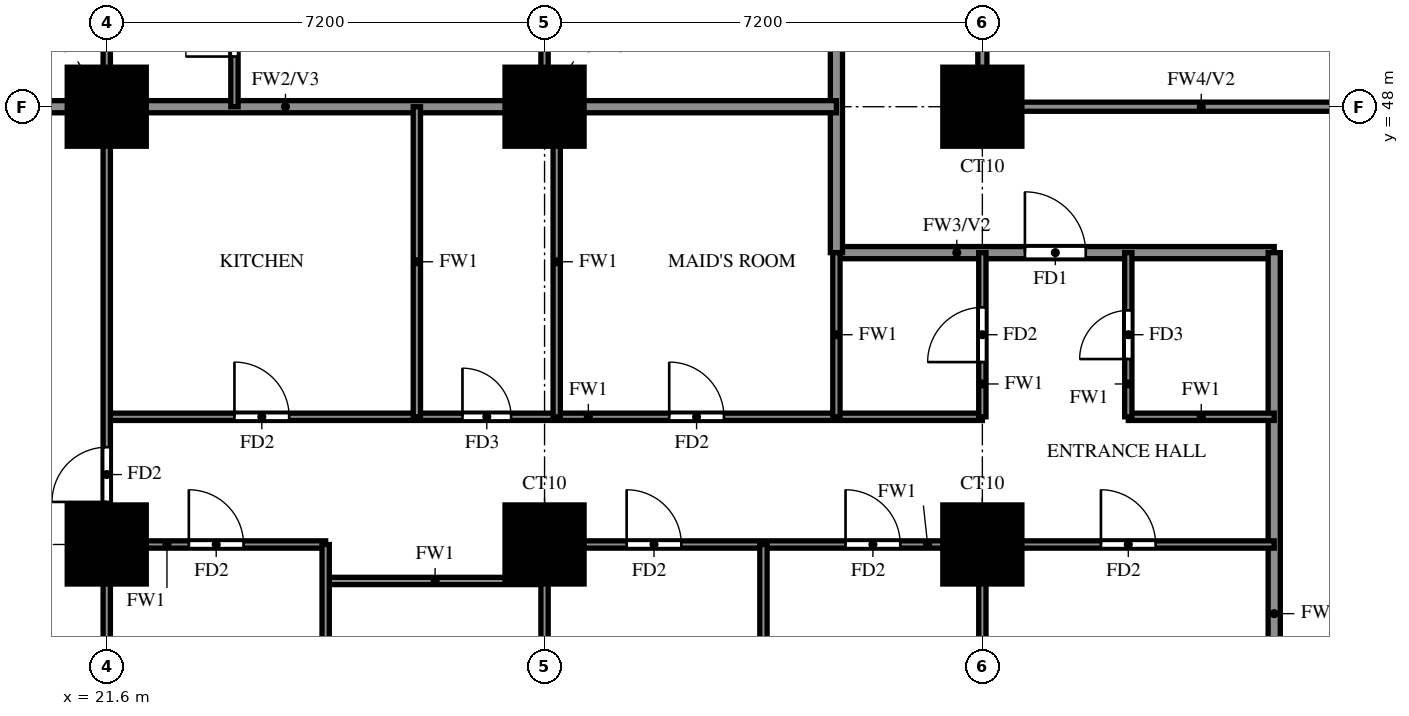
"""IFC4 building model, lengths in metres.
Left out: names, types, materials, properties, quantities, classifications, styles, units other than length and angle.
Written with IfcOpenShell. Run it as: python <this file> out.ifc"""

import sys

from ifc_helpers import new_model, si_unit, direction, frame, frame_2d, origin, origin_2d, place, context, subcontext, project, spatial, rectangle, extrude, source, transform, mapped, element, fill, save


model = new_model("IFC4")
c1 = context("Model", 3, precision=1e-05, world=origin(), true_north=direction((0.0, 1.0)))
c2 = subcontext(c1, "Body", "Model", "MODEL_VIEW")
j1 = project(units=[si_unit("LENGTHUNIT", "METRE"), si_unit("PLANEANGLEUNIT", "RADIAN")], contexts=[c1])
p1 = place(None, origin())
s1 = spatial("IfcSite", under=j1, at=p1, CompositionType="ELEMENT")
p2 = place(p1, origin())
s2 = spatial("IfcBuilding", under=s1, at=p2, CompositionType="ELEMENT")
p3 = place(p2, frame((0.0, 0.0, 86.5)))
s3 = spatial("IfcBuildingStorey", under=s2, at=p3, CompositionType="ELEMENT", Elevation=86.5)
m1 = source(origin(), c2, "Body", "SweptSolid", [
    extrude(rectangle(XDim=1.3, YDim=1.3, at=origin_2d()), origin(), (0.0, 0.0, 1.0), 3.18),
])
for number, where, z_axis, x_axis in (
    (1, (21.6, 40.8, 0.0), (0.0, 0.0, 1.0), (1.0, 0.0, 0.0)),
    (2, (28.8, 40.8, 0.0), (0.0, 0.0, 1.0), (1.0, 0.0, 0.0)),
    (3, (36.0, 40.8, 0.0), (0.0, 0.0, 1.0), (1.0, 0.0, 0.0)),
    (4, (21.6, 48.0, 0.0), (0.0, 0.0, 1.0), (1.0, 0.0, 0.0)),
    (5, (28.8, 48.0, 0.0), (0.0, 0.0, 1.0), (1.0, 0.0, 0.0)),
    (6, (36.0, 48.0, 0.0), (0.0, 0.0, 1.0), (1.0, 0.0, 0.0)),
):
    element("IfcColumn", number, at=place(p3, frame(where, z_axis=z_axis, x_axis=x_axis)), inside=s3, PredefinedType="COLUMN", context=c2, shape_type="MappedRepresentation", body=[
        mapped(m1, transform((0.0, 0.0, 0.0))),
    ])
p4 = place(p3, frame((33.6, 45.6, 0.0), z_axis=(0.0, 0.0, 1.0), x_axis=(1.0, 0.0, 0.0)))
e7 = element("IfcWall", 7, at=p4, inside=s3, PredefinedType="SOLIDWALL", context=c2, shape_type="SweptSolid", body=[
    extrude(rectangle(XDim=7.2, YDim=0.2, at=frame_2d((3.6, 0.0))), origin(), (0.0, 0.0, 1.0), 3.18),
])
p5 = place(p4, frame((3.1, 0.0, 0.0)))
e8 = element("IfcOpeningElement", 8, at=p5, cuts=e7, PredefinedType="OPENING", context=c2, shape_type="SweptSolid", body=[
    extrude(rectangle(XDim=1.0, YDim=2.1, at=frame_2d((0.5, 1.05))), frame((0.0, 0.11, 0.0), z_axis=(0.0, -1.0, 0.0), x_axis=(1.0, 0.0, 0.0)), (0.0, 0.0, 1.0), 0.22),
])
p6 = place(p3, frame((33.6, 45.6, 0.0), z_axis=(0.0, 0.0, 1.0), x_axis=(0.0, 1.0, 0.0)))
e9 = element("IfcWall", 9, at=p6, inside=s3, PredefinedType="SOLIDWALL", context=c2, shape_type="SweptSolid", body=[
    extrude(rectangle(XDim=12.0, YDim=0.2, at=frame_2d((6.0, 0.0))), origin(), (0.0, 0.0, 1.0), 3.18),
])
p7 = place(p3, frame((40.8, 33.725, 0.0), z_axis=(0.0, 0.0, 1.0), x_axis=(0.0, 1.0, 0.0)))
e10 = element("IfcWall", 10, at=p7, inside=s3, PredefinedType="SOLIDWALL", context=c2, shape_type="SweptSolid", body=[
    extrude(rectangle(XDim=11.875, YDim=0.2, at=frame_2d((5.938, 0.0))), origin(), (0.0, 0.0, 1.0), 2.28),
])
p8 = place(p3, frame((14.525, 48.0, 0.0), z_axis=(0.0, 0.0, 1.0), x_axis=(1.0, 0.0, 0.0)))
e11 = element("IfcWall", 11, at=p8, inside=s3, PredefinedType="SOLIDWALL", context=c2, shape_type="SweptSolid", body=[
    extrude(rectangle(XDim=19.075, YDim=0.2, at=frame_2d((9.538, 0.0))), origin(), (0.0, 0.0, 1.0), 3.18),
])
p9 = place(p3, frame((25.2, 40.2, 0.0), z_axis=(0.0, 0.0, 1.0), x_axis=(1.0, 0.0, 0.0)))
e12 = element("IfcWall", 12, at=p9, inside=s3, PredefinedType="PARTITIONING", context=c2, shape_type="SweptSolid", body=[
    extrude(rectangle(XDim=3.6, YDim=0.12, at=frame_2d((1.8, 0.0))), origin(), (0.0, 0.0, 1.0), 3.18),
])
p10 = place(p3, frame((21.6, 40.8, 0.0), z_axis=(0.0, 0.0, 1.0), x_axis=(1.0, 0.0, 0.0)))
e13 = element("IfcWall", 13, at=p10, inside=s3, PredefinedType="PARTITIONING", context=c2, shape_type="SweptSolid", body=[
    extrude(rectangle(XDim=3.6, YDim=0.12, at=frame_2d((1.8, 0.0))), origin(), (0.0, 0.0, 1.0), 3.18),
])
p11 = place(p10, frame((1.35, 0.0, 0.0)))
e14 = element("IfcOpeningElement", 14, at=p11, cuts=e13, PredefinedType="OPENING", context=c2, shape_type="SweptSolid", body=[
    extrude(rectangle(XDim=0.9, YDim=2.1, at=frame_2d((0.45, 1.05))), frame((0.0, 0.07, 0.0), z_axis=(0.0, -1.0, 0.0), x_axis=(1.0, 0.0, 0.0)), (0.0, 0.0, 1.0), 0.14),
])
p12 = place(p3, frame((28.8, 40.8, 0.0), z_axis=(0.0, 0.0, 1.0), x_axis=(1.0, 0.0, 0.0)))
e15 = element("IfcWall", 15, at=p12, inside=s3, PredefinedType="PARTITIONING", context=c2, shape_type="SweptSolid", body=[
    extrude(rectangle(XDim=12.0, YDim=0.12, at=frame_2d((6.0, 0.0))), origin(), (0.0, 0.0, 1.0), 3.18),
])
p13 = place(p12, frame((1.35, 0.0, 0.0)))
e16 = element("IfcOpeningElement", 16, at=p13, cuts=e15, PredefinedType="OPENING", context=c2, shape_type="SweptSolid", body=[
    extrude(rectangle(XDim=0.9, YDim=2.1, at=frame_2d((0.45, 1.05))), frame((0.0, 0.07, 0.0), z_axis=(0.0, -1.0, 0.0), x_axis=(1.0, 0.0, 0.0)), (0.0, 0.0, 1.0), 0.14),
])
p14 = place(p12, frame((4.95, 0.0, 0.0)))
e17 = element("IfcOpeningElement", 17, at=p14, cuts=e15, PredefinedType="OPENING", context=c2, shape_type="SweptSolid", body=[
    extrude(rectangle(XDim=0.9, YDim=2.1, at=frame_2d((0.45, 1.05))), frame((0.0, 0.07, 0.0), z_axis=(0.0, -1.0, 0.0), x_axis=(1.0, 0.0, 0.0)), (0.0, 0.0, 1.0), 0.14),
])
p15 = place(p12, frame((9.15, 0.0, 0.0)))
e18 = element("IfcOpeningElement", 18, at=p15, cuts=e15, PredefinedType="OPENING", context=c2, shape_type="SweptSolid", body=[
    extrude(rectangle(XDim=0.9, YDim=2.1, at=frame_2d((0.45, 1.05))), frame((0.0, 0.07, 0.0), z_axis=(0.0, -1.0, 0.0), x_axis=(1.0, 0.0, 0.0)), (0.0, 0.0, 1.0), 0.14),
])
p16 = place(p3, frame((21.6, 42.9, 0.0), z_axis=(0.0, 0.0, 1.0), x_axis=(1.0, 0.0, 0.0)))
e19 = element("IfcWall", 19, at=p16, inside=s3, PredefinedType="PARTITIONING", context=c2, shape_type="SweptSolid", body=[
    extrude(rectangle(XDim=14.4, YDim=0.12, at=frame_2d((7.2, 0.0))), origin(), (0.0, 0.0, 1.0), 3.18),
])
p17 = place(p16, frame((2.1, 0.0, 0.0)))
e20 = element("IfcOpeningElement", 20, at=p17, cuts=e19, PredefinedType="OPENING", context=c2, shape_type="SweptSolid", body=[
    extrude(rectangle(XDim=0.9, YDim=2.1, at=frame_2d((0.45, 1.05))), frame((0.0, 0.07, 0.0), z_axis=(0.0, -1.0, 0.0), x_axis=(1.0, 0.0, 0.0)), (0.0, 0.0, 1.0), 0.14),
])
p18 = place(p16, frame((5.85, 0.0, 0.0)))
e21 = element("IfcOpeningElement", 21, at=p18, cuts=e19, PredefinedType="OPENING", context=c2, shape_type="SweptSolid", body=[
    extrude(rectangle(XDim=0.8, YDim=2.1, at=frame_2d((0.4, 1.05))), frame((0.0, 0.07, 0.0), z_axis=(0.0, -1.0, 0.0), x_axis=(1.0, 0.0, 0.0)), (0.0, 0.0, 1.0), 0.14),
])
p19 = place(p16, frame((9.25, 0.0, 0.0)))
e22 = element("IfcOpeningElement", 22, at=p19, cuts=e19, PredefinedType="OPENING", context=c2, shape_type="SweptSolid", body=[
    extrude(rectangle(XDim=0.9, YDim=2.1, at=frame_2d((0.45, 1.05))), frame((0.0, 0.07, 0.0), z_axis=(0.0, -1.0, 0.0), x_axis=(1.0, 0.0, 0.0)), (0.0, 0.0, 1.0), 0.14),
])
p20 = place(p3, frame((38.4, 42.9, 0.0), z_axis=(0.0, 0.0, 1.0), x_axis=(1.0, 0.0, 0.0)))
e23 = element("IfcWall", 23, at=p20, inside=s3, PredefinedType="PARTITIONING", context=c2, shape_type="SweptSolid", body=[
    extrude(rectangle(XDim=2.4, YDim=0.12, at=frame_2d((1.2, 0.0))), origin(), (0.0, 0.0, 1.0), 3.18),
])
p21 = place(p3, frame((21.6, 33.725, 0.0), z_axis=(0.0, 0.0, 1.0), x_axis=(0.0, 1.0, 0.0)))
e24 = element("IfcWall", 24, at=p21, inside=s3, PredefinedType="PARTITIONING", context=c2, shape_type="SweptSolid", body=[
    extrude(rectangle(XDim=32.275, YDim=0.12, at=frame_2d((16.137, 0.0))), origin(), (0.0, 0.0, 1.0), 3.18),
])
p22 = place(p21, frame((7.775, 0.0, 0.0)))
e25 = element("IfcOpeningElement", 25, at=p22, cuts=e24, PredefinedType="OPENING", context=c2, shape_type="SweptSolid", body=[
    extrude(rectangle(XDim=0.9, YDim=2.1, at=frame_2d((0.45, 1.05))), frame((0.0, 0.07, 0.0), z_axis=(0.0, -1.0, 0.0), x_axis=(1.0, 0.0, 0.0)), (0.0, 0.0, 1.0), 0.14),
])
p23 = place(p21, frame((15.625, 0.0, 0.0)))
e26 = element("IfcOpeningElement", 26, at=p23, cuts=e24, PredefinedType="OPENING", context=c2, shape_type="SweptSolid", body=[
    extrude(rectangle(XDim=0.9, YDim=2.1, at=frame_2d((0.45, 1.05))), frame((0.0, 0.07, 0.0), z_axis=(0.0, -1.0, 0.0), x_axis=(1.0, 0.0, 0.0)), (0.0, 0.0, 1.0), 0.14),
])
p24 = place(p21, frame((22.225, 0.0, 0.0)))
e27 = element("IfcOpeningElement", 27, at=p24, cuts=e24, PredefinedType="OPENING", context=c2, shape_type="SweptSolid", body=[
    extrude(rectangle(XDim=1.5, YDim=2.1, at=frame_2d((0.75, 1.05))), frame((0.0, 0.07, 0.0), z_axis=(0.0, -1.0, 0.0), x_axis=(1.0, 0.0, 0.0)), (0.0, 0.0, 1.0), 0.14),
])
p25 = place(p21, frame((26.425, 0.0, 0.0)))
e28 = element("IfcOpeningElement", 28, at=p25, cuts=e24, PredefinedType="OPENING", context=c2, shape_type="SweptSolid", body=[
    extrude(rectangle(XDim=0.9, YDim=2.1, at=frame_2d((0.45, 1.05))), frame((0.0, 0.07, 0.0), z_axis=(0.0, -1.0, 0.0), x_axis=(1.0, 0.0, 0.0)), (0.0, 0.0, 1.0), 0.14),
])
p26 = place(p21, frame((30.025, 0.0, 0.0)))
e29 = element("IfcOpeningElement", 29, at=p26, cuts=e24, PredefinedType="OPENING", context=c2, shape_type="SweptSolid", body=[
    extrude(rectangle(XDim=0.9, YDim=2.1, at=frame_2d((0.45, 1.05))), frame((0.0, 0.07, 0.0), z_axis=(0.0, -1.0, 0.0), x_axis=(1.0, 0.0, 0.0)), (0.0, 0.0, 1.0), 0.14),
])
p27 = place(p3, frame((23.7, 48.0, 0.0), z_axis=(0.0, 0.0, 1.0), x_axis=(0.0, 1.0, 0.0)))
e30 = element("IfcWall", 30, at=p27, inside=s3, PredefinedType="PARTITIONING", context=c2, shape_type="SweptSolid", body=[
    extrude(rectangle(XDim=7.2, YDim=0.12, at=frame_2d((3.6, 0.0))), origin(), (0.0, 0.0, 1.0), 3.18),
])
p28 = place(p27, frame((0.825, 0.0, 0.0)))
e31 = element("IfcOpeningElement", 31, at=p28, cuts=e30, PredefinedType="OPENING", context=c2, shape_type="SweptSolid", body=[
    extrude(rectangle(XDim=0.8, YDim=2.1, at=frame_2d((0.4, 1.05))), frame((0.0, 0.07, 0.0), z_axis=(0.0, -1.0, 0.0), x_axis=(1.0, 0.0, 0.0)), (0.0, 0.0, 1.0), 0.14),
])
p29 = place(p3, frame((25.2, 33.725, 0.0), z_axis=(0.0, 0.0, 1.0), x_axis=(0.0, 1.0, 0.0)))
e32 = element("IfcWall", 32, at=p29, inside=s3, PredefinedType="PARTITIONING", context=c2, shape_type="SweptSolid", body=[
    extrude(rectangle(XDim=7.075, YDim=0.12, at=frame_2d((3.538, 0.0))), origin(), (0.0, 0.0, 1.0), 2.28),
])
p30 = place(p29, frame((2.837, 0.0, 0.0)))
e33 = element("IfcOpeningElement", 33, at=p30, cuts=e32, PredefinedType="OPENING", context=c2, shape_type="SweptSolid", body=[
    extrude(rectangle(XDim=0.8, YDim=2.1, at=frame_2d((0.4, 1.05))), frame((0.0, 0.07, 0.0), z_axis=(0.0, -1.0, 0.0), x_axis=(1.0, 0.0, 0.0)), (0.0, 0.0, 1.0), 0.14),
])
p31 = place(p3, frame((26.7, 42.9, 0.0), z_axis=(0.0, 0.0, 1.0), x_axis=(0.0, 1.0, 0.0)))
e34 = element("IfcWall", 34, at=p31, inside=s3, PredefinedType="PARTITIONING", context=c2, shape_type="SweptSolid", body=[
    extrude(rectangle(XDim=5.1, YDim=0.12, at=frame_2d((2.55, 0.0))), origin(), (0.0, 0.0, 1.0), 3.18),
])
p32 = place(p3, frame((28.8, 33.725, 0.0), z_axis=(0.0, 0.0, 1.0), x_axis=(0.0, 1.0, 0.0)))
e35 = element("IfcWall", 35, at=p32, inside=s3, PredefinedType="PARTITIONING", context=c2, shape_type="SweptSolid", body=[
    extrude(rectangle(XDim=7.075, YDim=0.12, at=frame_2d((3.538, 0.0))), origin(), (0.0, 0.0, 1.0), 3.18),
])
p33 = place(p3, frame((28.8, 48.0, 0.0), z_axis=(0.0, 0.0, 1.0), x_axis=(0.0, 1.0, 0.0)))
e36 = element("IfcWall", 36, at=p33, inside=s3, PredefinedType="PARTITIONING", context=c2, shape_type="SweptSolid", body=[
    extrude(rectangle(XDim=7.2, YDim=0.12, at=frame_2d((3.6, 0.0))), origin(), (0.0, 0.0, 1.0), 3.18),
])
p34 = place(p3, frame((29.0, 42.9, 0.0), z_axis=(0.0, 0.0, 1.0), x_axis=(0.0, 1.0, 0.0)))
e37 = element("IfcWall", 37, at=p34, inside=s3, PredefinedType="PARTITIONING", context=c2, shape_type="SweptSolid", body=[
    extrude(rectangle(XDim=5.1, YDim=0.12, at=frame_2d((2.55, 0.0))), origin(), (0.0, 0.0, 1.0), 3.18),
])
p35 = place(p3, frame((32.4, 33.725, 0.0), z_axis=(0.0, 0.0, 1.0), x_axis=(0.0, 1.0, 0.0)))
e38 = element("IfcWall", 38, at=p35, inside=s3, PredefinedType="PARTITIONING", context=c2, shape_type="SweptSolid", body=[
    extrude(rectangle(XDim=7.075, YDim=0.12, at=frame_2d((3.538, 0.0))), origin(), (0.0, 0.0, 1.0), 2.28),
])
p36 = place(p3, frame((33.6, 42.9, 0.0), z_axis=(0.0, 0.0, 1.0), x_axis=(0.0, 1.0, 0.0)))
e39 = element("IfcWall", 39, at=p36, inside=s3, PredefinedType="PARTITIONING", context=c2, shape_type="SweptSolid", body=[
    extrude(rectangle(XDim=2.7, YDim=0.12, at=frame_2d((1.35, 0.0))), origin(), (0.0, 0.0, 1.0), 3.18),
])
p37 = place(p3, frame((36.0, 33.725, 0.0), z_axis=(0.0, 0.0, 1.0), x_axis=(0.0, 1.0, 0.0)))
e40 = element("IfcWall", 40, at=p37, inside=s3, PredefinedType="PARTITIONING", context=c2, shape_type="SweptSolid", body=[
    extrude(rectangle(XDim=7.075, YDim=0.12, at=frame_2d((3.538, 0.0))), origin(), (0.0, 0.0, 1.0), 3.18),
])
p38 = place(p3, frame((36.0, 42.9, 0.0), z_axis=(0.0, 0.0, 1.0), x_axis=(0.0, 1.0, 0.0)))
e41 = element("IfcWall", 41, at=p38, inside=s3, PredefinedType="PARTITIONING", context=c2, shape_type="SweptSolid", body=[
    extrude(rectangle(XDim=2.7, YDim=0.12, at=frame_2d((1.35, 0.0))), origin(), (0.0, 0.0, 1.0), 3.18),
])
p39 = place(p38, frame((0.9, 0.0, 0.0)))
e42 = element("IfcOpeningElement", 42, at=p39, cuts=e41, PredefinedType="OPENING", context=c2, shape_type="SweptSolid", body=[
    extrude(rectangle(XDim=0.9, YDim=2.1, at=frame_2d((0.45, 1.05))), frame((0.0, 0.07, 0.0), z_axis=(0.0, -1.0, 0.0), x_axis=(1.0, 0.0, 0.0)), (0.0, 0.0, 1.0), 0.14),
])
p40 = place(p3, frame((38.4, 42.9, 0.0), z_axis=(0.0, 0.0, 1.0), x_axis=(0.0, 1.0, 0.0)))
e43 = element("IfcWall", 43, at=p40, inside=s3, PredefinedType="PARTITIONING", context=c2, shape_type="SweptSolid", body=[
    extrude(rectangle(XDim=2.7, YDim=0.12, at=frame_2d((1.35, 0.0))), origin(), (0.0, 0.0, 1.0), 3.18),
])
p41 = place(p40, frame((0.95, 0.0, 0.0)))
e44 = element("IfcOpeningElement", 44, at=p41, cuts=e43, PredefinedType="OPENING", context=c2, shape_type="SweptSolid", body=[
    extrude(rectangle(XDim=0.8, YDim=2.1, at=frame_2d((0.4, 1.05))), frame((0.0, 0.07, 0.0), z_axis=(0.0, -1.0, 0.0), x_axis=(1.0, 0.0, 0.0)), (0.0, 0.0, 1.0), 0.14),
])
p42 = place(p3, frame((36.0, 48.0, 0.0), z_axis=(0.0, 0.0, 1.0), x_axis=(1.0, 0.0, 0.0)))
e45 = element("IfcWall", 45, at=p42, inside=s3, PredefinedType="SOLIDWALL", context=c2, shape_type="SweptSolid", body=[
    extrude(rectangle(XDim=7.2, YDim=0.15, at=frame_2d((3.6, 0.0))), origin(), (0.0, 0.0, 1.0), 2.28),
])
p43 = place(p3, frame((36.0, 48.0, 0.0), z_axis=(0.0, 0.0, 1.0), x_axis=(0.0, 1.0, 0.0)))
e46 = element("IfcWall", 46, at=p43, inside=s3, PredefinedType="SOLIDWALL", context=c2, shape_type="SweptSolid", body=[
    extrude(rectangle(XDim=14.4, YDim=0.15, at=frame_2d((7.2, 0.0))), origin(), (0.0, 0.0, 1.0), 2.28),
])
p44 = place(p5, origin())
e47 = element("IfcDoor", 47, at=p44, inside=s3, OperationType="SINGLE_SWING_LEFT", PredefinedType="DOOR", context=c2, shape_type="SweptSolid", body=[
    extrude(rectangle(XDim=1.0, YDim=2.1, at=frame_2d((0.5, 1.05))), frame((0.0, 0.025, 0.0), z_axis=(0.0, -1.0, 0.0), x_axis=(1.0, 0.0, 0.0)), (0.0, 0.0, 1.0), 0.05),
])
fill(e8, e47)
p45 = place(p22, origin())
e48 = element("IfcDoor", 48, at=p45, inside=s3, OperationType="SINGLE_SWING_RIGHT", PredefinedType="DOOR", context=c2, shape_type="SweptSolid", body=[
    extrude(rectangle(XDim=0.9, YDim=2.1, at=frame_2d((0.45, 1.05))), frame((0.0, 0.025, 0.0), z_axis=(0.0, -1.0, 0.0), x_axis=(1.0, 0.0, 0.0)), (0.0, 0.0, 1.0), 0.05),
])
fill(e25, e48)
p46 = place(p11, origin())
e49 = element("IfcDoor", 49, at=p46, inside=s3, OperationType="SINGLE_SWING_RIGHT", PredefinedType="DOOR", context=c2, shape_type="SweptSolid", body=[
    extrude(rectangle(XDim=0.9, YDim=2.1, at=frame_2d((0.45, 1.05))), frame((0.0, 0.025, 0.0), z_axis=(0.0, -1.0, 0.0), x_axis=(1.0, 0.0, 0.0)), (0.0, 0.0, 1.0), 0.05),
])
fill(e14, e49)
p47 = place(p13, origin())
e50 = element("IfcDoor", 50, at=p47, inside=s3, OperationType="SINGLE_SWING_LEFT", PredefinedType="DOOR", context=c2, shape_type="SweptSolid", body=[
    extrude(rectangle(XDim=0.9, YDim=2.1, at=frame_2d((0.45, 1.05))), frame((0.0, 0.025, 0.0), z_axis=(0.0, -1.0, 0.0), x_axis=(1.0, 0.0, 0.0)), (0.0, 0.0, 1.0), 0.05),
])
fill(e16, e50)
p48 = place(p14, origin())
e51 = element("IfcDoor", 51, at=p48, inside=s3, OperationType="SINGLE_SWING_RIGHT", PredefinedType="DOOR", context=c2, shape_type="SweptSolid", body=[
    extrude(rectangle(XDim=0.9, YDim=2.1, at=frame_2d((0.45, 1.05))), frame((0.0, 0.025, 0.0), z_axis=(0.0, -1.0, 0.0), x_axis=(1.0, 0.0, 0.0)), (0.0, 0.0, 1.0), 0.05),
])
fill(e17, e51)
p49 = place(p15, origin())
e52 = element("IfcDoor", 52, at=p49, inside=s3, OperationType="SINGLE_SWING_LEFT", PredefinedType="DOOR", context=c2, shape_type="SweptSolid", body=[
    extrude(rectangle(XDim=0.9, YDim=2.1, at=frame_2d((0.45, 1.05))), frame((0.0, 0.025, 0.0), z_axis=(0.0, -1.0, 0.0), x_axis=(1.0, 0.0, 0.0)), (0.0, 0.0, 1.0), 0.05),
])
fill(e18, e52)
p50 = place(p17, origin())
e53 = element("IfcDoor", 53, at=p50, inside=s3, OperationType="SINGLE_SWING_LEFT", PredefinedType="DOOR", context=c2, shape_type="SweptSolid", body=[
    extrude(rectangle(XDim=0.9, YDim=2.1, at=frame_2d((0.45, 1.05))), frame((0.0, 0.025, 0.0), z_axis=(0.0, -1.0, 0.0), x_axis=(1.0, 0.0, 0.0)), (0.0, 0.0, 1.0), 0.05),
])
fill(e20, e53)
p51 = place(p18, origin())
e54 = element("IfcDoor", 54, at=p51, inside=s3, OperationType="SINGLE_SWING_RIGHT", PredefinedType="DOOR", context=c2, shape_type="SweptSolid", body=[
    extrude(rectangle(XDim=0.8, YDim=2.1, at=frame_2d((0.4, 1.05))), frame((0.0, 0.025, 0.0), z_axis=(0.0, -1.0, 0.0), x_axis=(1.0, 0.0, 0.0)), (0.0, 0.0, 1.0), 0.05),
])
fill(e21, e54)
p52 = place(p19, origin())
e55 = element("IfcDoor", 55, at=p52, inside=s3, OperationType="SINGLE_SWING_LEFT", PredefinedType="DOOR", context=c2, shape_type="SweptSolid", body=[
    extrude(rectangle(XDim=0.9, YDim=2.1, at=frame_2d((0.45, 1.05))), frame((0.0, 0.025, 0.0), z_axis=(0.0, -1.0, 0.0), x_axis=(1.0, 0.0, 0.0)), (0.0, 0.0, 1.0), 0.05),
])
fill(e22, e55)
p53 = place(p39, origin())
e56 = element("IfcDoor", 56, at=p53, inside=s3, OperationType="SINGLE_SWING_LEFT", PredefinedType="DOOR", context=c2, shape_type="SweptSolid", body=[
    extrude(rectangle(XDim=0.9, YDim=2.1, at=frame_2d((0.45, 1.05))), frame((0.0, 0.025, 0.0), z_axis=(0.0, -1.0, 0.0), x_axis=(1.0, 0.0, 0.0)), (0.0, 0.0, 1.0), 0.05),
])
fill(e42, e56)
p54 = place(p41, origin())
e57 = element("IfcDoor", 57, at=p54, inside=s3, OperationType="SINGLE_SWING_RIGHT", PredefinedType="DOOR", context=c2, shape_type="SweptSolid", body=[
    extrude(rectangle(XDim=0.8, YDim=2.1, at=frame_2d((0.4, 1.05))), frame((0.0, 0.025, 0.0), z_axis=(0.0, -1.0, 0.0), x_axis=(1.0, 0.0, 0.0)), (0.0, 0.0, 1.0), 0.05),
])
fill(e44, e57)
p55 = place(p28, origin())
e58 = element("IfcDoor", 58, at=p55, inside=s3, OperationType="SINGLE_SWING_LEFT", PredefinedType="DOOR", context=c2, shape_type="SweptSolid", body=[
    extrude(rectangle(XDim=0.8, YDim=2.1, at=frame_2d((0.4, 1.05))), frame((0.0, 0.025, 0.0), z_axis=(0.0, -1.0, 0.0), x_axis=(1.0, 0.0, 0.0)), (0.0, 0.0, 1.0), 0.05),
])
fill(e31, e58)
save(model, sys.argv[1])
